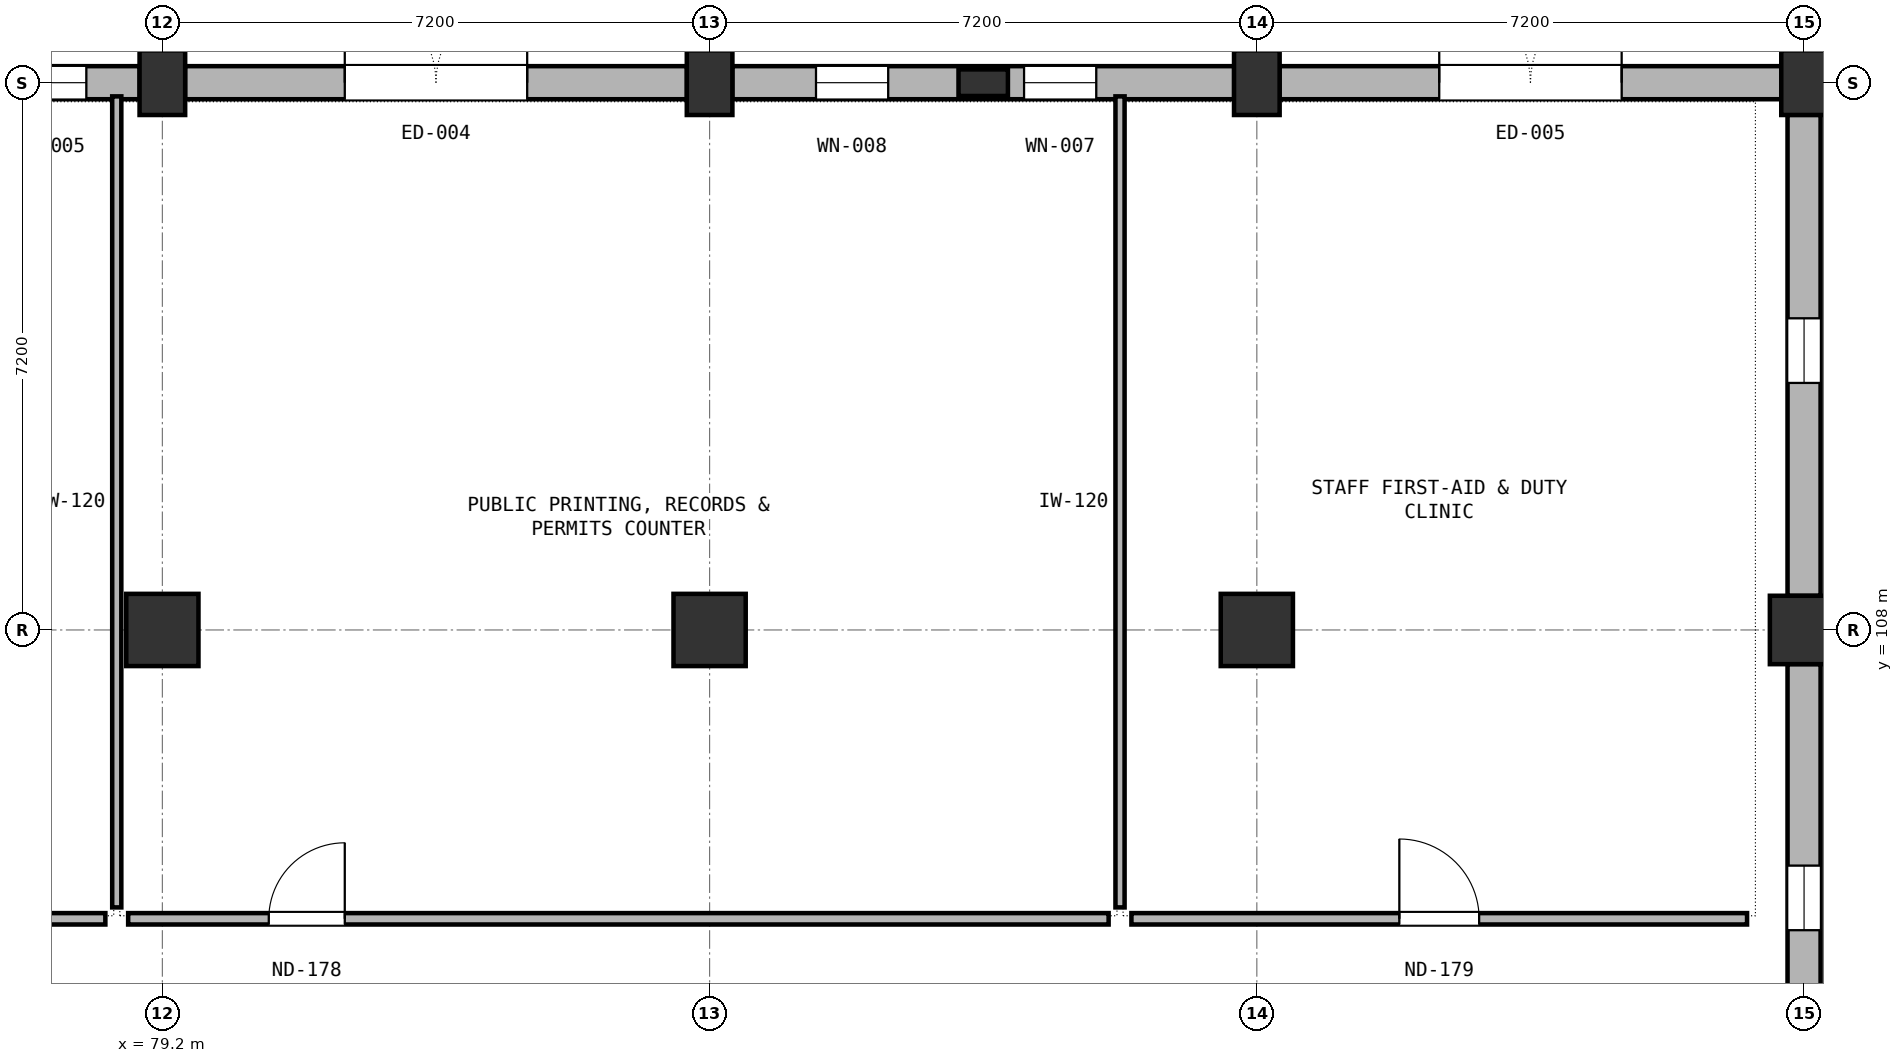
"""IFC4 building model, lengths in metres.
Left out: names, types, materials, properties, quantities, classifications, styles, units other than length and angle.
Written with IfcOpenShell. Run it as: python <this file> out.ifc"""

import sys

from ifc_helpers import new_model, si_unit, direction, frame, frame_2d, origin, origin_2d, place, context, subcontext, project, spatial, rectangle, extrude, element, fill, save


model = new_model("IFC4")
c1 = context("Model", 3, precision=1e-05, world=origin(), true_north=direction((0.0, 1.0)))
c2 = subcontext(c1, "Body", "Model", "MODEL_VIEW")
j1 = project(units=[si_unit("LENGTHUNIT", "METRE"), si_unit("PLANEANGLEUNIT", "RADIAN")], contexts=[c1])
p1 = place(None, origin())
s1 = spatial("IfcSite", under=j1, at=p1, CompositionType="ELEMENT")
p2 = place(p1, origin())
s2 = spatial("IfcBuilding", under=s1, at=p2, CompositionType="ELEMENT")
p3 = place(p2, origin())
s3 = spatial("IfcBuildingStorey", under=s2, at=p3, CompositionType="ELEMENT", Elevation=0.0)
p4 = place(p3, frame((79.2, 108.0, 0.0), z_axis=(0.0, 0.0, 1.0), x_axis=(1.0, 0.0, 0.0)))
e1 = element("IfcColumn", 1, at=p4, inside=s3, PredefinedType="COLUMN", context=c2, shape_type="SweptSolid", body=[
    extrude(rectangle(XDim=0.95, YDim=0.95, at=origin_2d()), origin(), (0.0, 0.0, 1.0), 5.4),
])
p5 = place(p3, frame((79.2, 115.2, 0.0), z_axis=(0.0, 0.0, 1.0), x_axis=(1.0, 0.0, 0.0)))
e2 = element("IfcColumn", 2, at=p5, inside=s3, PredefinedType="COLUMN", context=c2, shape_type="SweptSolid", body=[
    extrude(rectangle(XDim=0.6, YDim=0.85, at=origin_2d()), origin(), (0.0, 0.0, 1.0), 5.4),
])
p6 = place(p3, frame((86.4, 108.0, 0.0), z_axis=(0.0, 0.0, 1.0), x_axis=(1.0, 0.0, 0.0)))
e3 = element("IfcColumn", 3, at=p6, inside=s3, PredefinedType="COLUMN", context=c2, shape_type="SweptSolid", body=[
    extrude(rectangle(XDim=0.95, YDim=0.95, at=origin_2d()), origin(), (0.0, 0.0, 1.0), 5.4),
])
p7 = place(p3, frame((86.4, 115.2, 0.0), z_axis=(0.0, 0.0, 1.0), x_axis=(1.0, 0.0, 0.0)))
e4 = element("IfcColumn", 4, at=p7, inside=s3, PredefinedType="COLUMN", context=c2, shape_type="SweptSolid", body=[
    extrude(rectangle(XDim=0.6, YDim=0.85, at=origin_2d()), origin(), (0.0, 0.0, 1.0), 5.4),
])
p8 = place(p3, frame((93.6, 108.0, 0.0), z_axis=(0.0, 0.0, 1.0), x_axis=(1.0, 0.0, 0.0)))
e5 = element("IfcColumn", 5, at=p8, inside=s3, PredefinedType="COLUMN", context=c2, shape_type="SweptSolid", body=[
    extrude(rectangle(XDim=0.95, YDim=0.95, at=origin_2d()), origin(), (0.0, 0.0, 1.0), 5.4),
])
p9 = place(p3, frame((93.6, 115.2, 0.0), z_axis=(0.0, 0.0, 1.0), x_axis=(1.0, 0.0, 0.0)))
e6 = element("IfcColumn", 6, at=p9, inside=s3, PredefinedType="COLUMN", context=c2, shape_type="SweptSolid", body=[
    extrude(rectangle(XDim=0.6, YDim=0.85, at=origin_2d()), origin(), (0.0, 0.0, 1.0), 5.4),
])
p10 = place(p3, frame((100.8, 108.0, 0.0), z_axis=(0.0, 0.0, 1.0), x_axis=(1.0, 0.0, 0.0)))
e7 = element("IfcColumn", 7, at=p10, inside=s3, PredefinedType="COLUMN", context=c2, shape_type="SweptSolid", body=[
    extrude(rectangle(XDim=0.9, YDim=0.9, at=origin_2d()), origin(), (0.0, 0.0, 1.0), 5.4),
])
p11 = place(p3, frame((100.8, 115.2, 0.0), z_axis=(0.0, 0.0, 1.0), x_axis=(1.0, 0.0, 0.0)))
e8 = element("IfcColumn", 8, at=p11, inside=s3, PredefinedType="COLUMN", context=c2, shape_type="SweptSolid", body=[
    extrude(rectangle(XDim=0.6, YDim=0.85, at=origin_2d()), origin(), (0.0, 0.0, 1.0), 5.4),
])
p12 = place(p3, frame((90.0, 115.2, 0.0), z_axis=(0.0, 0.0, 1.0), x_axis=(1.0, 0.0, 0.0)))
e9 = element("IfcColumn", 9, at=p12, inside=s3, PredefinedType="PILASTER", context=c2, shape_type="SweptSolid", body=[
    extrude(rectangle(XDim=0.65, YDim=0.35, at=origin_2d()), origin(), (0.0, 0.0, 1.0), 5.4),
])
p13 = place(p3, frame((78.902, 115.2, 0.0), z_axis=(0.0, 0.0, 1.0), x_axis=(-1.0, 0.0, 0.0)))
e10 = element("IfcWall", 10, at=p13, inside=s3, PredefinedType="SOLIDWALL", context=c2, shape_type="SweptSolid", body=[
    extrude(rectangle(XDim=6.604, YDim=0.435, at=frame_2d((3.302, 0.0))), origin(), (0.0, 0.0, 1.0), 4.1),
])
p14 = place(p13, frame((0.702, 0.0, 0.7)))
e11 = element("IfcOpeningElement", 11, at=p14, cuts=e10, PredefinedType="OPENING", context=c2, shape_type="SweptSolid", body=[
    extrude(rectangle(XDim=0.95, YDim=2.6, at=frame_2d((0.475, 1.3))), frame((0.0, 0.228, 0.0), z_axis=(0.0, -1.0, 0.0), x_axis=(1.0, 0.0, 0.0)), (0.0, 0.0, 1.0), 0.455),
])
p15 = place(p13, frame((4.552, 0.0, 0.7)))
e12 = element("IfcOpeningElement", 12, at=p15, cuts=e10, PredefinedType="OPENING", context=c2, shape_type="SweptSolid", body=[
    extrude(rectangle(XDim=0.95, YDim=2.6, at=frame_2d((0.475, 1.3))), frame((0.0, 0.228, 0.0), z_axis=(0.0, -1.0, 0.0), x_axis=(1.0, 0.0, 0.0)), (0.0, 0.0, 1.0), 0.455),
])
p16 = place(p3, frame((86.102, 115.2, 0.0), z_axis=(0.0, 0.0, 1.0), x_axis=(-1.0, 0.0, 0.0)))
e13 = element("IfcWall", 13, at=p16, inside=s3, PredefinedType="SOLIDWALL", context=c2, shape_type="SweptSolid", body=[
    extrude(rectangle(XDim=6.604, YDim=0.435, at=frame_2d((3.302, 0.0))), origin(), (0.0, 0.0, 1.0), 4.1),
])
p17 = place(p16, frame((2.102, 0.0, 0.0)))
e14 = element("IfcOpeningElement", 14, at=p17, cuts=e13, PredefinedType="OPENING", context=c2, shape_type="SweptSolid", body=[
    extrude(rectangle(XDim=2.4, YDim=2.8, at=frame_2d((1.2, 1.4))), frame((0.0, 0.228, 0.0), z_axis=(0.0, -1.0, 0.0), x_axis=(1.0, 0.0, 0.0)), (0.0, 0.0, 1.0), 0.455),
])
p18 = place(p3, frame((93.302, 115.2, 0.0), z_axis=(0.0, 0.0, 1.0), x_axis=(-1.0, 0.0, 0.0)))
e15 = element("IfcWall", 15, at=p18, inside=s3, PredefinedType="SOLIDWALL", context=c2, shape_type="SweptSolid", body=[
    extrude(rectangle(XDim=6.604, YDim=0.435, at=frame_2d((3.302, 0.0))), origin(), (0.0, 0.0, 1.0), 4.1),
])
p19 = place(p18, frame((1.814, 0.0, 0.7)))
e16 = element("IfcOpeningElement", 16, at=p19, cuts=e15, PredefinedType="OPENING", context=c2, shape_type="SweptSolid", body=[
    extrude(rectangle(XDim=0.95, YDim=2.6, at=frame_2d((0.475, 1.3))), frame((0.0, 0.228, 0.0), z_axis=(0.0, -1.0, 0.0), x_axis=(1.0, 0.0, 0.0)), (0.0, 0.0, 1.0), 0.455),
])
p20 = place(p18, frame((4.552, 0.0, 0.7)))
e17 = element("IfcOpeningElement", 17, at=p20, cuts=e15, PredefinedType="OPENING", context=c2, shape_type="SweptSolid", body=[
    extrude(rectangle(XDim=0.95, YDim=2.6, at=frame_2d((0.475, 1.3))), frame((0.0, 0.228, 0.0), z_axis=(0.0, -1.0, 0.0), x_axis=(1.0, 0.0, 0.0)), (0.0, 0.0, 1.0), 0.455),
])
p21 = place(p3, frame((100.502, 115.2, 0.0), z_axis=(0.0, 0.0, 1.0), x_axis=(-1.0, 0.0, 0.0)))
e18 = element("IfcWall", 18, at=p21, inside=s3, PredefinedType="SOLIDWALL", context=c2, shape_type="SweptSolid", body=[
    extrude(rectangle(XDim=6.604, YDim=0.435, at=frame_2d((3.302, 0.0))), origin(), (0.0, 0.0, 1.0), 4.1),
])
p22 = place(p21, frame((2.102, 0.0, 0.0)))
e19 = element("IfcOpeningElement", 19, at=p22, cuts=e18, PredefinedType="OPENING", context=c2, shape_type="SweptSolid", body=[
    extrude(rectangle(XDim=2.4, YDim=2.8, at=frame_2d((1.2, 1.4))), frame((0.0, 0.228, 0.0), z_axis=(0.0, -1.0, 0.0), x_axis=(1.0, 0.0, 0.0)), (0.0, 0.0, 1.0), 0.455),
])
p23 = place(p3, frame((100.8, 107.552, 0.0), z_axis=(0.0, 0.0, 1.0), x_axis=(0.0, -1.0, 0.0)))
e20 = element("IfcWall", 20, at=p23, inside=s3, PredefinedType="SOLIDWALL", context=c2, shape_type="SweptSolid", body=[
    extrude(rectangle(XDim=6.304, YDim=0.435, at=frame_2d((3.152, 0.0))), origin(), (0.0, 0.0, 1.0), 4.1),
])
p24 = place(p23, frame((2.652, 0.0, 0.7)))
e21 = element("IfcOpeningElement", 21, at=p24, cuts=e20, PredefinedType="OPENING", context=c2, shape_type="SweptSolid", body=[
    extrude(rectangle(XDim=0.85, YDim=2.2, at=frame_2d((0.425, 1.1))), frame((0.0, 0.228, 0.0), z_axis=(0.0, -1.0, 0.0), x_axis=(1.0, 0.0, 0.0)), (0.0, 0.0, 1.0), 0.455),
])
p25 = place(p3, frame((100.8, 114.777, 0.0), z_axis=(0.0, 0.0, 1.0), x_axis=(0.0, -1.0, 0.0)))
e22 = element("IfcWall", 22, at=p25, inside=s3, PredefinedType="SOLIDWALL", context=c2, shape_type="SweptSolid", body=[
    extrude(rectangle(XDim=6.329, YDim=0.435, at=frame_2d((3.165, 0.0))), origin(), (0.0, 0.0, 1.0), 4.1),
])
p26 = place(p25, frame((2.677, 0.0, 0.7)))
e23 = element("IfcOpeningElement", 23, at=p26, cuts=e22, PredefinedType="OPENING", context=c2, shape_type="SweptSolid", body=[
    extrude(rectangle(XDim=0.85, YDim=2.2, at=frame_2d((0.425, 1.1))), frame((0.0, 0.228, 0.0), z_axis=(0.0, -1.0, 0.0), x_axis=(1.0, 0.0, 0.0)), (0.0, 0.0, 1.0), 0.455),
])
p27 = place(p3, frame((63.95, 104.2, 0.0), z_axis=(0.0, 0.0, 1.0), x_axis=(1.0, 0.0, 0.0)))
e24 = element("IfcWall", 24, at=p27, inside=s3, PredefinedType="PARTITIONING", context=c2, shape_type="SweptSolid", body=[
    extrude(rectangle(XDim=14.5, YDim=0.15, at=frame_2d((7.25, 0.0))), origin(), (0.0, 0.0, 1.0), 4.12),
])
p28 = place(p27, frame((1.55, 0.0, 0.0)))
e25 = element("IfcOpeningElement", 25, at=p28, cuts=e24, PredefinedType="OPENING", context=c2, shape_type="SweptSolid", body=[
    extrude(rectangle(XDim=1.6, YDim=2.2, at=frame_2d((0.8, 1.1))), frame((0.0, 0.085, 0.0), z_axis=(0.0, -1.0, 0.0), x_axis=(1.0, 0.0, 0.0)), (0.0, 0.0, 1.0), 0.17),
])
p29 = place(p3, frame((78.75, 104.2, 0.0), z_axis=(0.0, 0.0, 1.0), x_axis=(1.0, 0.0, 0.0)))
e26 = element("IfcWall", 26, at=p29, inside=s3, PredefinedType="PARTITIONING", context=c2, shape_type="SweptSolid", body=[
    extrude(rectangle(XDim=12.9, YDim=0.15, at=frame_2d((6.45, 0.0))), origin(), (0.0, 0.0, 1.0), 4.12),
])
p30 = place(p29, frame((1.85, 0.0, 0.0)))
e27 = element("IfcOpeningElement", 27, at=p30, cuts=e26, PredefinedType="OPENING", context=c2, shape_type="SweptSolid", body=[
    extrude(rectangle(XDim=1.0, YDim=2.15, at=frame_2d((0.5, 1.075))), frame((0.0, 0.085, 0.0), z_axis=(0.0, -1.0, 0.0), x_axis=(1.0, 0.0, 0.0)), (0.0, 0.0, 1.0), 0.17),
])
p31 = place(p3, frame((78.6, 104.35, 0.0), z_axis=(0.0, 0.0, 1.0), x_axis=(0.0, 1.0, 0.0)))
e28 = element("IfcWall", 28, at=p31, inside=s3, PredefinedType="PARTITIONING", context=c2, shape_type="SweptSolid", body=[
    extrude(rectangle(XDim=10.67, YDim=0.12, at=frame_2d((5.335, 0.0))), origin(), (0.0, 0.0, 1.0), 4.12),
])
p32 = place(p3, frame((91.95, 104.2, 0.0), z_axis=(0.0, 0.0, 1.0), x_axis=(1.0, 0.0, 0.0)))
e29 = element("IfcWall", 29, at=p32, inside=s3, PredefinedType="PARTITIONING", context=c2, shape_type="SweptSolid", body=[
    extrude(rectangle(XDim=8.1, YDim=0.15, at=frame_2d((4.05, 0.0))), origin(), (0.0, 0.0, 1.0), 4.12),
])
p33 = place(p32, frame((3.525, 0.0, 0.0)))
e30 = element("IfcOpeningElement", 30, at=p33, cuts=e29, PredefinedType="OPENING", context=c2, shape_type="SweptSolid", body=[
    extrude(rectangle(XDim=1.05, YDim=2.15, at=frame_2d((0.525, 1.075))), frame((0.0, 0.085, 0.0), z_axis=(0.0, -1.0, 0.0), x_axis=(1.0, 0.0, 0.0)), (0.0, 0.0, 1.0), 0.17),
])
p34 = place(p3, frame((91.8, 104.35, 0.0), z_axis=(0.0, 0.0, 1.0), x_axis=(0.0, 1.0, 0.0)))
e31 = element("IfcWall", 31, at=p34, inside=s3, PredefinedType="PARTITIONING", context=c2, shape_type="SweptSolid", body=[
    extrude(rectangle(XDim=10.67, YDim=0.12, at=frame_2d((5.335, 0.0))), origin(), (0.0, 0.0, 1.0), 4.12),
])
p35 = place(p14, origin())
e32 = element("IfcWindow", 32, at=p35, inside=s3, PartitioningType="SINGLE_PANEL", PredefinedType="WINDOW", context=c2, shape_type="SweptSolid", body=[
    extrude(rectangle(XDim=0.95, YDim=2.6, at=frame_2d((0.475, 1.3))), frame((0.0, 0.03, 0.0), z_axis=(0.0, -1.0, 0.0), x_axis=(1.0, 0.0, 0.0)), (0.0, 0.0, 1.0), 0.06),
])
fill(e11, e32)
p36 = place(p17, frame((2.4, 0.0, 0.0), z_axis=(0.0, 0.0, 1.0), x_axis=(-1.0, 0.0, 0.0)))
e33 = element("IfcDoor", 33, at=p36, inside=s3, OperationType="DOUBLE_DOOR_SINGLE_SWING", PredefinedType="DOOR", context=c2, shape_type="SweptSolid", body=[
    extrude(rectangle(XDim=2.4, YDim=2.8, at=frame_2d((1.2, 1.4))), frame((0.0, 0.025, 0.0), z_axis=(0.0, -1.0, 0.0), x_axis=(1.0, 0.0, 0.0)), (0.0, 0.0, 1.0), 0.05),
])
fill(e14, e33)
p37 = place(p19, origin())
e34 = element("IfcWindow", 34, at=p37, inside=s3, PartitioningType="SINGLE_PANEL", PredefinedType="WINDOW", context=c2, shape_type="SweptSolid", body=[
    extrude(rectangle(XDim=0.95, YDim=2.6, at=frame_2d((0.475, 1.3))), frame((0.0, 0.03, 0.0), z_axis=(0.0, -1.0, 0.0), x_axis=(1.0, 0.0, 0.0)), (0.0, 0.0, 1.0), 0.06),
])
fill(e16, e34)
p38 = place(p20, origin())
e35 = element("IfcWindow", 35, at=p38, inside=s3, PartitioningType="SINGLE_PANEL", PredefinedType="WINDOW", context=c2, shape_type="SweptSolid", body=[
    extrude(rectangle(XDim=0.95, YDim=2.6, at=frame_2d((0.475, 1.3))), frame((0.0, 0.03, 0.0), z_axis=(0.0, -1.0, 0.0), x_axis=(1.0, 0.0, 0.0)), (0.0, 0.0, 1.0), 0.06),
])
fill(e17, e35)
p39 = place(p22, frame((2.4, 0.0, 0.0), z_axis=(0.0, 0.0, 1.0), x_axis=(-1.0, 0.0, 0.0)))
e36 = element("IfcDoor", 36, at=p39, inside=s3, OperationType="DOUBLE_DOOR_SINGLE_SWING", PredefinedType="DOOR", context=c2, shape_type="SweptSolid", body=[
    extrude(rectangle(XDim=2.4, YDim=2.8, at=frame_2d((1.2, 1.4))), frame((0.0, 0.025, 0.0), z_axis=(0.0, -1.0, 0.0), x_axis=(1.0, 0.0, 0.0)), (0.0, 0.0, 1.0), 0.05),
])
fill(e19, e36)
p40 = place(p24, origin())
e37 = element("IfcWindow", 37, at=p40, inside=s3, PartitioningType="SINGLE_PANEL", PredefinedType="WINDOW", context=c2, shape_type="SweptSolid", body=[
    extrude(rectangle(XDim=0.85, YDim=2.2, at=frame_2d((0.425, 1.1))), frame((0.0, 0.03, 0.0), z_axis=(0.0, -1.0, 0.0), x_axis=(1.0, 0.0, 0.0)), (0.0, 0.0, 1.0), 0.06),
])
fill(e21, e37)
p41 = place(p26, origin())
e38 = element("IfcWindow", 38, at=p41, inside=s3, PartitioningType="SINGLE_PANEL", PredefinedType="WINDOW", context=c2, shape_type="SweptSolid", body=[
    extrude(rectangle(XDim=0.85, YDim=2.2, at=frame_2d((0.425, 1.1))), frame((0.0, 0.03, 0.0), z_axis=(0.0, -1.0, 0.0), x_axis=(1.0, 0.0, 0.0)), (0.0, 0.0, 1.0), 0.06),
])
fill(e23, e38)
p42 = place(p30, origin())
e39 = element("IfcDoor", 39, at=p42, inside=s3, OperationType="SINGLE_SWING_RIGHT", PredefinedType="DOOR", context=c2, shape_type="SweptSolid", body=[
    extrude(rectangle(XDim=1.0, YDim=2.15, at=frame_2d((0.5, 1.075))), frame((0.0, 0.025, 0.0), z_axis=(0.0, -1.0, 0.0), x_axis=(1.0, 0.0, 0.0)), (0.0, 0.0, 1.0), 0.05),
])
fill(e27, e39)
p43 = place(p33, origin())
e40 = element("IfcDoor", 40, at=p43, inside=s3, OperationType="SINGLE_SWING_LEFT", PredefinedType="DOOR", context=c2, shape_type="SweptSolid", body=[
    extrude(rectangle(XDim=1.05, YDim=2.15, at=frame_2d((0.525, 1.075))), frame((0.0, 0.025, 0.0), z_axis=(0.0, -1.0, 0.0), x_axis=(1.0, 0.0, 0.0)), (0.0, 0.0, 1.0), 0.05),
])
fill(e30, e40)
save(model, sys.argv[1])
